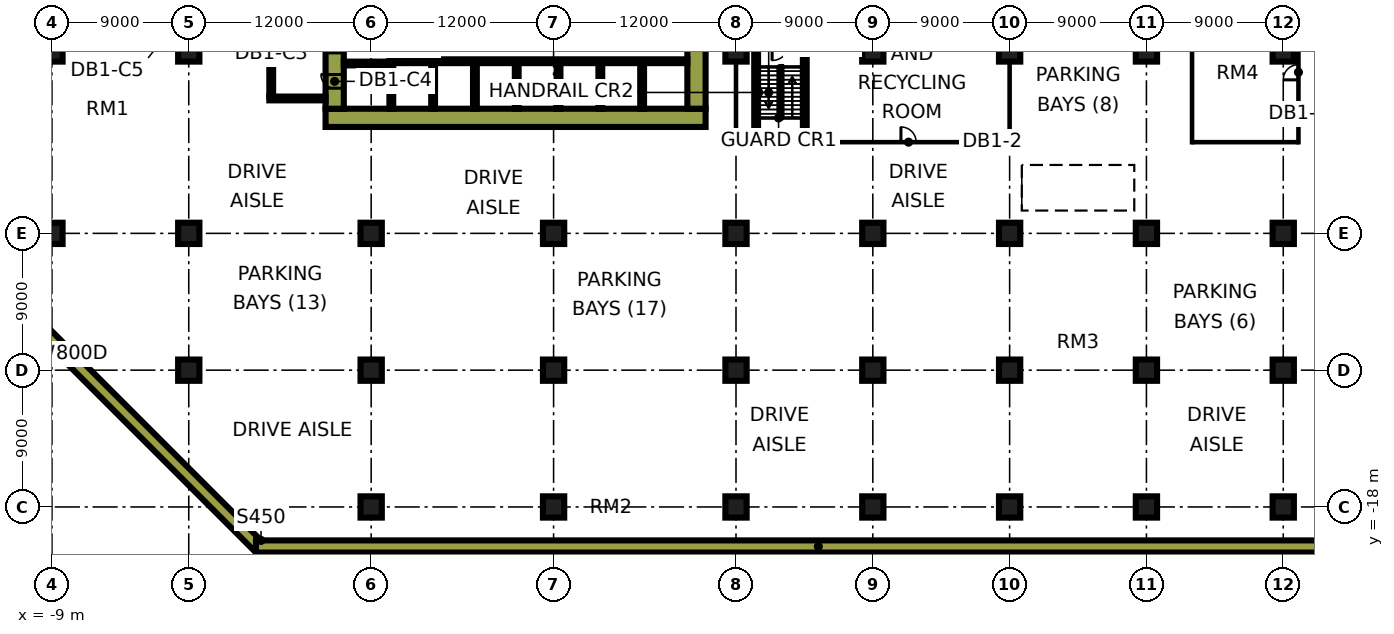
"""IFC4 building model, lengths in metres.
Left out: names, types, materials, properties, quantities, classifications, styles, units other than length and angle.
Written with IfcOpenShell. Run it as: python <this file> out.ifc"""

import sys

from ifc_helpers import new_model, si_unit, direction, frame, frame_2d, origin, origin_2d, place, context, subcontext, project, spatial, rectangle, extrude, element, fill, save


model = new_model("IFC4")
c1 = context("Model", 3, precision=1e-05, world=origin(), true_north=direction((0.0, 1.0)))
c2 = subcontext(c1, "Body", "Model", "MODEL_VIEW")
j1 = project(units=[si_unit("LENGTHUNIT", "METRE"), si_unit("PLANEANGLEUNIT", "RADIAN")], contexts=[c1])
p1 = place(None, origin())
s1 = spatial("IfcSite", under=j1, at=p1, CompositionType="ELEMENT")
p2 = place(p1, origin())
s2 = spatial("IfcBuilding", under=s1, at=p2, CompositionType="ELEMENT")
p3 = place(p2, frame((0.0, 0.0, -4.5)))
s3 = spatial("IfcBuildingStorey", under=s2, at=p3, CompositionType="ELEMENT", Elevation=-4.5)
for number, where, z_axis, x_axis in (
    (1, (-9.0, 0.0, 0.0), (0.0, 0.0, 1.0), (1.0, 0.0, 0.0)),
    (2, (-9.0, 12.0, 0.0), (0.0, 0.0, 1.0), (1.0, 0.0, 0.0)),
    (3, (0.0, -9.0, 0.0), (0.0, 0.0, 1.0), (1.0, 0.0, 0.0)),
    (4, (0.0, 0.0, 0.0), (0.0, 0.0, 1.0), (1.0, 0.0, 0.0)),
    (5, (0.0, 12.0, 0.0), (0.0, 0.0, 1.0), (1.0, 0.0, 0.0)),
    (6, (12.0, -18.0, 0.0), (0.0, 0.0, 1.0), (1.0, 0.0, 0.0)),
    (7, (12.0, -9.0, 0.0), (0.0, 0.0, 1.0), (1.0, 0.0, 0.0)),
    (8, (12.0, 0.0, 0.0), (0.0, 0.0, 1.0), (1.0, 0.0, 0.0)),
    (9, (24.0, -18.0, 0.0), (0.0, 0.0, 1.0), (1.0, 0.0, 0.0)),
    (10, (24.0, -9.0, 0.0), (0.0, 0.0, 1.0), (1.0, 0.0, 0.0)),
    (11, (24.0, 0.0, 0.0), (0.0, 0.0, 1.0), (1.0, 0.0, 0.0)),
    (12, (36.0, -18.0, 0.0), (0.0, 0.0, 1.0), (1.0, 0.0, 0.0)),
    (13, (36.0, -9.0, 0.0), (0.0, 0.0, 1.0), (1.0, 0.0, 0.0)),
    (14, (36.0, 0.0, 0.0), (0.0, 0.0, 1.0), (1.0, 0.0, 0.0)),
    (15, (36.0, 12.0, 0.0), (0.0, 0.0, 1.0), (1.0, 0.0, 0.0)),
    (16, (45.0, -18.0, 0.0), (0.0, 0.0, 1.0), (1.0, 0.0, 0.0)),
    (17, (45.0, -9.0, 0.0), (0.0, 0.0, 1.0), (1.0, 0.0, 0.0)),
    (18, (45.0, 0.0, 0.0), (0.0, 0.0, 1.0), (1.0, 0.0, 0.0)),
    (19, (45.0, 12.0, 0.0), (0.0, 0.0, 1.0), (1.0, 0.0, 0.0)),
    (20, (54.0, -18.0, 0.0), (0.0, 0.0, 1.0), (1.0, 0.0, 0.0)),
    (21, (54.0, -9.0, 0.0), (0.0, 0.0, 1.0), (1.0, 0.0, 0.0)),
    (22, (54.0, 0.0, 0.0), (0.0, 0.0, 1.0), (1.0, 0.0, 0.0)),
    (23, (54.0, 12.0, 0.0), (0.0, 0.0, 1.0), (1.0, 0.0, 0.0)),
    (24, (63.0, -18.0, 0.0), (0.0, 0.0, 1.0), (1.0, 0.0, 0.0)),
    (25, (63.0, -9.0, 0.0), (0.0, 0.0, 1.0), (1.0, 0.0, 0.0)),
    (26, (63.0, 0.0, 0.0), (0.0, 0.0, 1.0), (1.0, 0.0, 0.0)),
    (27, (63.0, 12.0, 0.0), (0.0, 0.0, 1.0), (1.0, 0.0, 0.0)),
    (28, (72.0, -18.0, 0.0), (0.0, 0.0, 1.0), (1.0, 0.0, 0.0)),
    (29, (72.0, -9.0, 0.0), (0.0, 0.0, 1.0), (1.0, 0.0, 0.0)),
    (30, (72.0, 0.0, 0.0), (0.0, 0.0, 1.0), (1.0, 0.0, 0.0)),
    (31, (72.0, 12.0, 0.0), (0.0, 0.0, 1.0), (1.0, 0.0, 0.0)),
):
    element("IfcColumn", number, at=place(p3, frame(where, z_axis=z_axis, x_axis=x_axis)), inside=s3, PredefinedType="COLUMN", context=c2, shape_type="SweptSolid", body=[
        extrude(rectangle(XDim=1.4, YDim=1.4, at=origin_2d()), origin(), (0.0, 0.0, 1.0), 4.5),
    ])
p4 = place(p3, frame((9.0, 7.6, 0.0), z_axis=(0.0, 0.0, 1.0), x_axis=(1.0, 0.0, 0.0)))
e32 = element("IfcWall", 32, at=p4, inside=s3, PredefinedType="SHEAR", context=c2, shape_type="SweptSolid", body=[
    extrude(rectangle(XDim=25.0, YDim=1.2, at=frame_2d((12.5, 0.0))), origin(), (0.0, 0.0, 1.0), 4.5),
])
p5 = place(p3, frame((9.6, 8.2, 0.0), z_axis=(0.0, 0.0, 1.0), x_axis=(0.0, 1.0, 0.0)))
e33 = element("IfcWall", 33, at=p5, inside=s3, PredefinedType="SHEAR", context=c2, shape_type="SweptSolid", body=[
    extrude(rectangle(XDim=10.6, YDim=1.2, at=frame_2d((5.3, 0.0))), origin(), (0.0, 0.0, 1.0), 4.5),
])
p6 = place(p5, frame((3.675, 0.0, 0.0)))
e34 = element("IfcOpeningElement", 34, at=p6, cuts=e33, PredefinedType="OPENING", context=c2, shape_type="SweptSolid", body=[
    extrude(rectangle(XDim=1.1, YDim=2.2, at=frame_2d((0.55, 1.1))), frame((0.0, 0.61, 0.0), z_axis=(0.0, -1.0, 0.0), x_axis=(1.0, 0.0, 0.0)), (0.0, 0.0, 1.0), 1.22),
])
p7 = place(p5, frame((6.175, 0.0, 0.0)))
e35 = element("IfcOpeningElement", 35, at=p7, cuts=e33, PredefinedType="OPENING", context=c2, shape_type="SweptSolid", body=[
    extrude(rectangle(XDim=1.1, YDim=2.2, at=frame_2d((0.55, 1.1))), frame((0.0, 0.61, 0.0), z_axis=(0.0, -1.0, 0.0), x_axis=(1.0, 0.0, 0.0)), (0.0, 0.0, 1.0), 1.22),
])
p8 = place(p5, frame((8.8, 0.0, 0.0)))
e36 = element("IfcOpeningElement", 36, at=p8, cuts=e33, PredefinedType="OPENING", context=c2, shape_type="SweptSolid", body=[
    extrude(rectangle(XDim=1.1, YDim=2.2, at=frame_2d((0.55, 1.1))), frame((0.0, 0.61, 0.0), z_axis=(0.0, -1.0, 0.0), x_axis=(1.0, 0.0, 0.0)), (0.0, 0.0, 1.0), 1.22),
])
p9 = place(p5, frame((1.35, 0.0, 0.0)))
e37 = element("IfcOpeningElement", 37, at=p9, cuts=e33, PredefinedType="OPENING", context=c2, shape_type="SweptSolid", body=[
    extrude(rectangle(XDim=0.9, YDim=2.1, at=frame_2d((0.45, 1.05))), frame((0.0, 0.61, 0.0), z_axis=(0.0, -1.0, 0.0), x_axis=(1.0, 0.0, 0.0)), (0.0, 0.0, 1.0), 1.22),
])
p10 = place(p3, frame((33.4, 8.2, 0.0), z_axis=(0.0, 0.0, 1.0), x_axis=(0.0, 1.0, 0.0)))
e38 = element("IfcWall", 38, at=p10, inside=s3, PredefinedType="SHEAR", context=c2, shape_type="SweptSolid", body=[
    extrude(rectangle(XDim=10.6, YDim=1.2, at=frame_2d((5.3, 0.0))), origin(), (0.0, 0.0, 1.0), 4.5),
])
p11 = place(p10, frame((5.0, 0.0, 0.0)))
e39 = element("IfcOpeningElement", 39, at=p11, cuts=e38, PredefinedType="OPENING", context=c2, shape_type="SweptSolid", body=[
    extrude(rectangle(XDim=1.8, YDim=2.4, at=frame_2d((0.9, 1.2))), frame((0.0, 0.61, 0.0), z_axis=(0.0, -1.0, 0.0), x_axis=(1.0, 0.0, 0.0)), (0.0, 0.0, 1.0), 1.22),
])
p12 = place(p3, frame((13.325, 8.2, 0.0), z_axis=(0.0, 0.0, 1.0), x_axis=(0.0, 1.0, 0.0)))
e40 = element("IfcWall", 40, at=p12, inside=s3, PredefinedType="SHEAR", context=c2, shape_type="SweptSolid", body=[
    extrude(rectangle(XDim=10.6, YDim=0.25, at=frame_2d((5.3, 0.0))), origin(), (0.0, 0.0, 1.0), 4.5),
])
p13 = place(p3, frame((13.45, 11.325, 0.0), z_axis=(0.0, 0.0, 1.0), x_axis=(1.0, 0.0, 0.0)))
e41 = element("IfcWall", 41, at=p13, inside=s3, PredefinedType="SHEAR", context=c2, shape_type="SweptSolid", body=[
    extrude(rectangle(XDim=19.35, YDim=0.25, at=frame_2d((9.675, 0.0))), origin(), (0.0, 0.0, 1.0), 4.5),
])
for number, where, z_axis, x_axis in (
    (42, (10.2, 11.175, 0.0), (0.0, 0.0, 1.0), (1.0, 0.0, 0.0)),
    (43, (16.075, 8.2, 0.0), (0.0, 0.0, 1.0), (0.0, 1.0, 0.0)),
    (44, (18.825, 8.2, 0.0), (0.0, 0.0, 1.0), (0.0, 1.0, 0.0)),
    (45, (21.575, 8.2, 0.0), (0.0, 0.0, 1.0), (0.0, 1.0, 0.0)),
    (46, (24.325, 8.2, 0.0), (0.0, 0.0, 1.0), (0.0, 1.0, 0.0)),
    (47, (27.075, 8.2, 0.0), (0.0, 0.0, 1.0), (0.0, 1.0, 0.0)),
    (48, (29.825, 8.2, 0.0), (0.0, 0.0, 1.0), (0.0, 1.0, 0.0)),
):
    element("IfcWall", number, at=place(p3, frame(where, z_axis=z_axis, x_axis=x_axis)), inside=s3, PredefinedType="SHEAR", context=c2, shape_type="SweptSolid", body=[
        extrude(rectangle(XDim=3.0, YDim=0.25, at=frame_2d((1.5, 0.0))), origin(), (0.0, 0.0, 1.0), 4.5),
    ])
p14 = place(p3, frame((5.3, 8.875, 0.0), z_axis=(0.0, 0.0, 1.0), x_axis=(1.0, 0.0, 0.0)))
e49 = element("IfcWall", 49, at=p14, inside=s3, PredefinedType="SHEAR", context=c2, shape_type="SweptSolid", body=[
    extrude(rectangle(XDim=3.7, YDim=0.25, at=frame_2d((1.85, 0.0))), origin(), (0.0, 0.0, 1.0), 4.5),
])
p15 = place(p3, frame((5.425, 9.0, 0.0), z_axis=(0.0, 0.0, 1.0), x_axis=(0.0, 1.0, 0.0)))
e50 = element("IfcWall", 50, at=p15, inside=s3, PredefinedType="SHEAR", context=c2, shape_type="SweptSolid", body=[
    extrude(rectangle(XDim=4.0, YDim=0.25, at=frame_2d((2.0, 0.0))), origin(), (0.0, 0.0, 1.0), 4.5),
])
p16 = place(p3, frame((37.2, 5.725, 0.0), z_axis=(0.0, 0.0, 1.0), x_axis=(1.0, 0.0, 0.0)))
e51 = element("IfcWall", 51, at=p16, inside=s3, PredefinedType="SHEAR", context=c2, shape_type="SweptSolid", body=[
    extrude(rectangle(XDim=3.45, YDim=0.25, at=frame_2d((1.725, 0.0))), origin(), (0.0, 0.0, 1.0), 4.5),
])
for number, where, z_axis, x_axis in (
    (52, (37.325, 5.85, 0.0), (0.0, 0.0, 1.0), (0.0, 1.0, 0.0)),
    (53, (40.525, 5.85, 0.0), (0.0, 0.0, 1.0), (0.0, 1.0, 0.0)),
):
    element("IfcWall", number, at=place(p3, frame(where, z_axis=z_axis, x_axis=x_axis)), inside=s3, PredefinedType="SHEAR", context=c2, shape_type="SweptSolid", body=[
        extrude(rectangle(XDim=6.5, YDim=0.25, at=frame_2d((3.25, 0.0))), origin(), (0.0, 0.0, 1.0), 4.5),
    ])
p17 = place(p3, frame((-20.717, 4.706, 0.0), z_axis=(0.0, 0.0, 1.0), x_axis=(0.707103370229, -0.707110192127, 0.0)))
e54 = element("IfcWall", 54, at=p17, inside=s3, PredefinedType="SOLIDWALL", context=c2, shape_type="SweptSolid", body=[
    extrude(rectangle(XDim=35.788, YDim=0.8, at=frame_2d((17.894, 0.0))), origin(), (0.0, 0.0, 1.0), 4.5),
])
p18 = place(p3, frame((4.423, -20.6, 0.0), z_axis=(0.0, 0.0, 1.0), x_axis=(1.0, 0.0, 0.0)))
e55 = element("IfcWall", 55, at=p18, inside=s3, PredefinedType="SOLIDWALL", context=c2, shape_type="SweptSolid", body=[
    extrude(rectangle(XDim=73.989, YDim=0.8, at=frame_2d((36.994, 0.0))), origin(), (0.0, 0.0, 1.0), 4.5),
])
p19 = place(p3, frame((36.0, 5.95, 0.0), z_axis=(0.0, 0.0, 1.0), x_axis=(0.0, 1.0, 0.0)))
e56 = element("IfcWall", 56, at=p19, inside=s3, PredefinedType="PARTITIONING", context=c2, shape_type="SweptSolid", body=[
    extrude(rectangle(XDim=5.351, YDim=0.1, at=frame_2d((2.676, 0.0))), origin(), (0.0, 0.0, 1.0), 4.05),
])
p20 = place(p3, frame((36.05, 6.0, 0.0), z_axis=(0.0, 0.0, 1.0), x_axis=(1.0, 0.0, 0.0)))
e57 = element("IfcWall", 57, at=p20, inside=s3, PredefinedType="PARTITIONING", context=c2, shape_type="SweptSolid", body=[
    extrude(rectangle(XDim=1.15, YDim=0.1, at=frame_2d((0.575, 0.0))), origin(), (0.0, 0.0, 1.0), 4.05),
])
p21 = place(p3, frame((40.65, 6.0, 0.0), z_axis=(0.0, 0.0, 1.0), x_axis=(1.0, 0.0, 0.0)))
e58 = element("IfcWall", 58, at=p21, inside=s3, PredefinedType="PARTITIONING", context=c2, shape_type="SweptSolid", body=[
    extrude(rectangle(XDim=13.4, YDim=0.1, at=frame_2d((6.7, 0.0))), origin(), (0.0, 0.0, 1.0), 4.05),
])
p22 = place(p21, frame((6.2, 0.0, 0.0)))
e59 = element("IfcOpeningElement", 59, at=p22, cuts=e58, PredefinedType="OPENING", context=c2, shape_type="SweptSolid", body=[
    extrude(rectangle(XDim=1.0, YDim=2.1, at=frame_2d((0.5, 1.05))), frame((0.0, 0.06, 0.0), z_axis=(0.0, -1.0, 0.0), x_axis=(1.0, 0.0, 0.0)), (0.0, 0.0, 1.0), 0.12),
])
p23 = place(p3, frame((54.0, 6.05, 0.0), z_axis=(0.0, 0.0, 1.0), x_axis=(0.0, 1.0, 0.0)))
e60 = element("IfcWall", 60, at=p23, inside=s3, PredefinedType="PARTITIONING", context=c2, shape_type="SweptSolid", body=[
    extrude(rectangle(XDim=5.251, YDim=0.1, at=frame_2d((2.625, 0.0))), origin(), (0.0, 0.0, 1.0), 4.05),
])
p24 = place(p3, frame((66.0, 5.95, 0.0), z_axis=(0.0, 0.0, 1.0), x_axis=(0.0, 1.0, 0.0)))
e61 = element("IfcWall", 61, at=p24, inside=s3, PredefinedType="PARTITIONING", context=c2, shape_type="SweptSolid", body=[
    extrude(rectangle(XDim=10.1, YDim=0.1, at=frame_2d((5.05, 0.0))), origin(), (0.0, 0.0, 1.0), 4.05),
])
p25 = place(p3, frame((66.05, 6.0, 0.0), z_axis=(0.0, 0.0, 1.0), x_axis=(1.0, 0.0, 0.0)))
e62 = element("IfcWall", 62, at=p25, inside=s3, PredefinedType="PARTITIONING", context=c2, shape_type="SweptSolid", body=[
    extrude(rectangle(XDim=6.9, YDim=0.1, at=frame_2d((3.45, 0.0))), origin(), (0.0, 0.0, 1.0), 4.05),
])
p26 = place(p3, frame((73.0, 5.95, 0.0), z_axis=(0.0, 0.0, 1.0), x_axis=(0.0, 1.0, 0.0)))
e63 = element("IfcWall", 63, at=p26, inside=s3, PredefinedType="PARTITIONING", context=c2, shape_type="SweptSolid", body=[
    extrude(rectangle(XDim=10.1, YDim=0.1, at=frame_2d((5.05, 0.0))), origin(), (0.0, 0.0, 1.0), 4.05),
])
p27 = place(p26, frame((4.15, 0.0, 0.0)))
e64 = element("IfcOpeningElement", 64, at=p27, cuts=e63, PredefinedType="OPENING", context=c2, shape_type="SweptSolid", body=[
    extrude(rectangle(XDim=1.0, YDim=2.1, at=frame_2d((0.5, 1.05))), frame((0.0, 0.06, 0.0), z_axis=(0.0, -1.0, 0.0), x_axis=(1.0, 0.0, 0.0)), (0.0, 0.0, 1.0), 0.12),
])
p28 = place(p6, origin())
e65 = element("IfcDoor", 65, at=p28, inside=s3, OperationType="DOUBLE_DOOR_SLIDING", PredefinedType="DOOR", context=c2, shape_type="SweptSolid", body=[
    extrude(rectangle(XDim=1.1, YDim=2.2, at=frame_2d((0.55, 1.1))), frame((0.0, 0.025, 0.0), z_axis=(0.0, -1.0, 0.0), x_axis=(1.0, 0.0, 0.0)), (0.0, 0.0, 1.0), 0.05),
])
fill(e34, e65)
p29 = place(p9, frame((0.9, 0.0, 0.0), z_axis=(0.0, 0.0, 1.0), x_axis=(-1.0, 0.0, 0.0)))
e66 = element("IfcDoor", 66, at=p29, inside=s3, OperationType="SINGLE_SWING_RIGHT", PredefinedType="DOOR", context=c2, shape_type="SweptSolid", body=[
    extrude(rectangle(XDim=0.9, YDim=2.1, at=frame_2d((0.45, 1.05))), frame((0.0, 0.025, 0.0), z_axis=(0.0, -1.0, 0.0), x_axis=(1.0, 0.0, 0.0)), (0.0, 0.0, 1.0), 0.05),
])
fill(e37, e66)
p30 = place(p22, origin())
e67 = element("IfcDoor", 67, at=p30, inside=s3, OperationType="SINGLE_SWING_LEFT", PredefinedType="DOOR", context=c2, shape_type="SweptSolid", body=[
    extrude(rectangle(XDim=1.0, YDim=2.1, at=frame_2d((0.5, 1.05))), frame((0.0, 0.025, 0.0), z_axis=(0.0, -1.0, 0.0), x_axis=(1.0, 0.0, 0.0)), (0.0, 0.0, 1.0), 0.05),
])
fill(e59, e67)
p31 = place(p27, origin())
e68 = element("IfcDoor", 68, at=p31, inside=s3, OperationType="SINGLE_SWING_LEFT", PredefinedType="DOOR", context=c2, shape_type="SweptSolid", body=[
    extrude(rectangle(XDim=1.0, YDim=2.1, at=frame_2d((0.5, 1.05))), frame((0.0, 0.025, 0.0), z_axis=(0.0, -1.0, 0.0), x_axis=(1.0, 0.0, 0.0)), (0.0, 0.0, 1.0), 0.05),
])
fill(e64, e68)
save(model, sys.argv[1])
